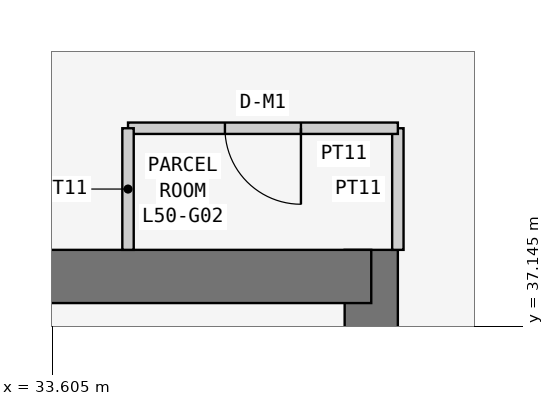
"""IFC4 building model, lengths in metres.
Left out: names, types, materials, properties, quantities, classifications, styles, units other than length and angle.
Written with IfcOpenShell. Run it as: python <this file> out.ifc"""

import sys

from ifc_helpers import new_model, si_unit, direction, frame, frame_2d, origin, place, context, subcontext, project, spatial, rectangle, extrude, element, fill, save


model = new_model("IFC4")
c1 = context("Model", 3, precision=1e-05, world=origin(), true_north=direction((0.0, 1.0)))
c2 = subcontext(c1, "Body", "Model", "MODEL_VIEW")
j1 = project(units=[si_unit("LENGTHUNIT", "METRE"), si_unit("PLANEANGLEUNIT", "RADIAN")], contexts=[c1])
p1 = place(None, origin())
s1 = spatial("IfcSite", under=j1, at=p1, CompositionType="ELEMENT")
p2 = place(p1, origin())
s2 = spatial("IfcBuilding", under=s1, at=p2, CompositionType="ELEMENT")
p3 = place(p2, frame((0.0, 0.0, 194.1)))
s3 = spatial("IfcBuildingStorey", under=s2, at=p3, CompositionType="ELEMENT", Elevation=194.1)
p4 = place(p3, frame((37.8, 21.0, 0.0), z_axis=(0.0, 0.0, 1.0), x_axis=(0.0, 1.0, 0.0)))
e1 = element("IfcWall", 1, at=p4, inside=s3, PredefinedType="SHEAR", context=c2, shape_type="SweptSolid", body=[
    extrude(rectangle(XDim=17.15, YDim=0.7, at=frame_2d((8.575, 0.0))), origin(), (0.0, 0.0, 1.0), 3.6),
])
p5 = place(p4, frame((5.2, 0.0, 0.0)))
e2 = element("IfcOpeningElement", 2, at=p5, cuts=e1, PredefinedType="OPENING", context=c2, shape_type="SweptSolid", body=[
    extrude(rectangle(XDim=1.2, YDim=2.1, at=frame_2d((0.6, 1.05))), frame((0.0, 0.36, 0.0), z_axis=(0.0, -1.0, 0.0), x_axis=(1.0, 0.0, 0.0)), (0.0, 0.0, 1.0), 0.72),
])
p6 = place(p3, frame((37.8, 37.8, 0.0), z_axis=(0.0, 0.0, 1.0), x_axis=(-1.0, 0.0, 0.0)))
e3 = element("IfcWall", 3, at=p6, inside=s3, PredefinedType="SHEAR", context=c2, shape_type="SweptSolid", body=[
    extrude(rectangle(XDim=17.15, YDim=0.7, at=frame_2d((8.575, 0.0))), origin(), (0.0, 0.0, 1.0), 3.6),
])
p7 = place(p3, frame((38.15, 38.15, 0.0), z_axis=(0.0, 0.0, 1.0), x_axis=(0.0, 1.0, 0.0)))
e4 = element("IfcWall", 4, at=p7, inside=s3, PredefinedType="PARTITIONING", context=c2, shape_type="SweptSolid", body=[
    extrude(rectangle(XDim=1.6, YDim=0.15, at=frame_2d((0.8, 0.0))), origin(), (0.0, 0.0, 1.0), 3.45),
])
p8 = place(p3, frame((38.15, 39.75, 0.0), z_axis=(0.0, 0.0, 1.0), x_axis=(-1.0, 0.0, 0.0)))
e5 = element("IfcWall", 5, at=p8, inside=s3, PredefinedType="PARTITIONING", context=c2, shape_type="SweptSolid", body=[
    extrude(rectangle(XDim=3.55, YDim=0.15, at=frame_2d((1.775, 0.0))), origin(), (0.0, 0.0, 1.0), 3.45),
])
p9 = place(p8, frame((1.275, 0.0, 0.0)))
e6 = element("IfcOpeningElement", 6, at=p9, cuts=e5, PredefinedType="OPENING", context=c2, shape_type="SweptSolid", body=[
    extrude(rectangle(XDim=1.0, YDim=2.1, at=frame_2d((0.5, 1.05))), frame((0.0, 0.085, 0.0), z_axis=(0.0, -1.0, 0.0), x_axis=(1.0, 0.0, 0.0)), (0.0, 0.0, 1.0), 0.17),
])
p10 = place(p3, frame((34.6, 39.75, 0.0), z_axis=(0.0, 0.0, 1.0), x_axis=(0.0, -1.0, 0.0)))
e7 = element("IfcWall", 7, at=p10, inside=s3, PredefinedType="PARTITIONING", context=c2, shape_type="SweptSolid", body=[
    extrude(rectangle(XDim=1.6, YDim=0.15, at=frame_2d((0.8, 0.0))), origin(), (0.0, 0.0, 1.0), 3.45),
])
p11 = place(p9, origin())
e8 = element("IfcDoor", 8, at=p11, inside=s3, OperationType="SINGLE_SWING_LEFT", PredefinedType="DOOR", context=c2, shape_type="SweptSolid", body=[
    extrude(rectangle(XDim=1.0, YDim=2.1, at=frame_2d((0.5, 1.05))), frame((0.0, 0.025, 0.0), z_axis=(0.0, -1.0, 0.0), x_axis=(1.0, 0.0, 0.0)), (0.0, 0.0, 1.0), 0.05),
])
fill(e6, e8)
save(model, sys.argv[1])
